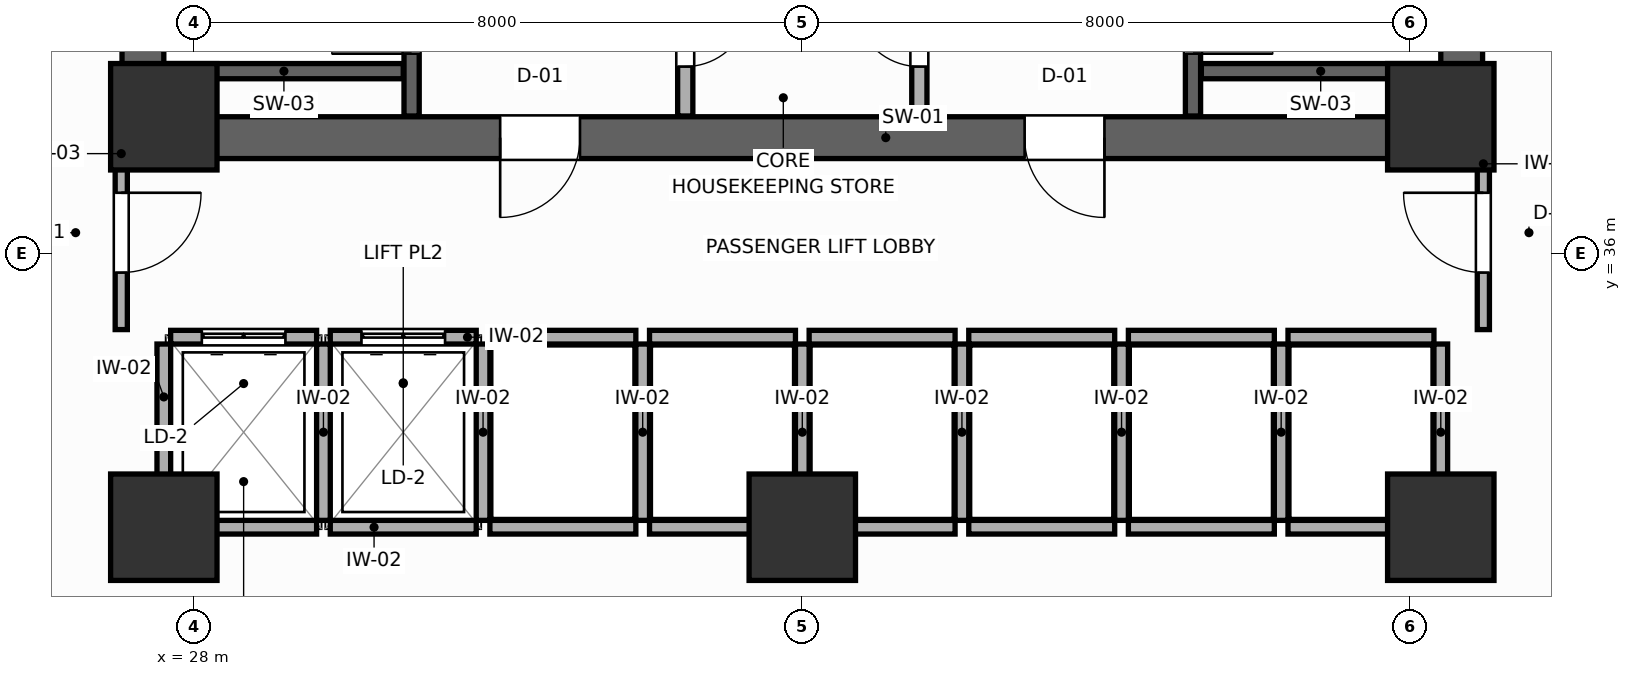
"""IFC4 building model, lengths in metres.
Left out: names, types, materials, properties, quantities, classifications, styles, units other than length and angle.
Written with IfcOpenShell. Run it as: python <this file> out.ifc"""

import sys

from ifc_helpers import new_model, si_unit, direction, frame, frame_2d, origin, origin_2d, place, context, subcontext, project, spatial, rectangle, extrude, source, transform, mapped, element, fill, save


model = new_model("IFC4")
c1 = context("Model", 3, precision=1e-05, world=origin(), true_north=direction((0.0, 1.0)))
c2 = subcontext(c1, "Body", "Model", "MODEL_VIEW")
j1 = project(units=[si_unit("LENGTHUNIT", "METRE"), si_unit("PLANEANGLEUNIT", "RADIAN")], contexts=[c1])
p1 = place(None, origin())
s1 = spatial("IfcSite", under=j1, at=p1, CompositionType="ELEMENT")
p2 = place(p1, origin())
s2 = spatial("IfcBuilding", under=s1, at=p2, CompositionType="ELEMENT")
p3 = place(p2, frame((0.0, 0.0, 24.0)))
s3 = spatial("IfcBuildingStorey", under=s2, at=p3, CompositionType="ELEMENT", Elevation=24.0)
p4 = place(p3, frame((27.05, 37.525, 0.0), z_axis=(0.0, 0.0, 1.0), x_axis=(1.0, 0.0, 0.0)))
e1 = element("IfcWall", 1, at=p4, inside=s3, PredefinedType="SHEAR", context=c2, shape_type="SweptSolid", body=[
    extrude(rectangle(XDim=17.9, YDim=0.55, at=frame_2d((8.95, 0.0))), origin(), (0.0, 0.0, 1.0), 3.9),
])
p5 = place(p4, frame((4.975, 0.0, 0.0)))
e2 = element("IfcOpeningElement", 2, at=p5, cuts=e1, PredefinedType="OPENING", context=c2, shape_type="SweptSolid", body=[
    extrude(rectangle(XDim=1.05, YDim=2.1, at=frame_2d((0.525, 1.05))), frame((0.0, 0.285, 0.0), z_axis=(0.0, -1.0, 0.0), x_axis=(1.0, 0.0, 0.0)), (0.0, 0.0, 1.0), 0.57),
])
p6 = place(p4, frame((11.875, 0.0, 0.0)))
e3 = element("IfcOpeningElement", 3, at=p6, cuts=e1, PredefinedType="OPENING", context=c2, shape_type="SweptSolid", body=[
    extrude(rectangle(XDim=1.05, YDim=2.1, at=frame_2d((0.525, 1.05))), frame((0.0, 0.285, 0.0), z_axis=(0.0, -1.0, 0.0), x_axis=(1.0, 0.0, 0.0)), (0.0, 0.0, 1.0), 0.57),
])
for number, where, z_axis, x_axis in (
    (4, (27.325, 37.8, 0.0), (0.0, 0.0, 1.0), (0.0, 1.0, 0.0)),
    (5, (44.675, 37.8, 0.0), (0.0, 0.0, 1.0), (0.0, 1.0, 0.0)),
):
    element("IfcWall", number, at=place(p3, frame(where, z_axis=z_axis, x_axis=x_axis)), inside=s3, PredefinedType="SHEAR", context=c2, shape_type="SweptSolid", body=[
        extrude(rectangle(XDim=9.0, YDim=0.55, at=frame_2d((4.5, 0.0))), origin(), (0.0, 0.0, 1.0), 3.9),
    ])
m1 = source(origin(), c2, "Body", "SweptSolid", [
    extrude(rectangle(XDim=1.4, YDim=1.4, at=origin_2d()), origin(), (0.0, 0.0, 1.0), 3.9),
])
for number, where, z_axis, x_axis in (
    (6, (27.6, 37.8, 0.0), (0.0, 0.0, 1.0), (1.0, 0.0, 0.0)),
    (7, (44.4, 37.8, 0.0), (0.0, 0.0, 1.0), (1.0, 0.0, 0.0)),
    (8, (27.6, 32.4, 0.0), (0.0, 0.0, 1.0), (1.0, 0.0, 0.0)),
    (9, (44.4, 32.4, 0.0), (0.0, 0.0, 1.0), (1.0, 0.0, 0.0)),
    (10, (36.0, 32.4, 0.0), (0.0, 0.0, 1.0), (1.0, 0.0, 0.0)),
):
    element("IfcColumn", number, at=place(p3, frame(where, z_axis=z_axis, x_axis=x_axis)), inside=s3, PredefinedType="COLUMN", context=c2, shape_type="MappedRepresentation", body=[
        mapped(m1, transform((0.0, 0.0, 0.0), scale=1.0)),
    ])
p7 = place(p3, frame((30.86, 37.81, 0.0), z_axis=(0.0, 0.0, 1.0), x_axis=(0.0, 1.0, 0.0)))
e11 = element("IfcWall", 11, at=p7, inside=s3, PredefinedType="SHEAR", context=c2, shape_type="SweptSolid", body=[
    extrude(rectangle(XDim=8.98, YDim=0.2, at=frame_2d((4.49, 0.0))), origin(), (0.0, 0.0, 1.0), 3.9),
])
p8 = place(p7, frame((0.82, 0.0, 0.0)))
e12 = element("IfcOpeningElement", 12, at=p8, cuts=e11, PredefinedType="OPENING", context=c2, shape_type="SweptSolid", body=[
    extrude(rectangle(XDim=1.05, YDim=2.1, at=frame_2d((0.525, 1.05))), frame((0.0, 0.11, 0.0), z_axis=(0.0, -1.0, 0.0), x_axis=(1.0, 0.0, 0.0)), (0.0, 0.0, 1.0), 0.22),
])
p9 = place(p3, frame((27.61, 38.4, 0.0), z_axis=(0.0, 0.0, 1.0), x_axis=(1.0, 0.0, 0.0)))
e13 = element("IfcWall", 13, at=p9, inside=s3, PredefinedType="SHEAR", context=c2, shape_type="SweptSolid", body=[
    extrude(rectangle(XDim=3.14, YDim=0.2, at=frame_2d((1.57, 0.0))), origin(), (0.0, 0.0, 1.0), 3.9),
])
p10 = place(p3, frame((41.14, 37.81, 0.0), z_axis=(0.0, 0.0, 1.0), x_axis=(0.0, 1.0, 0.0)))
e14 = element("IfcWall", 14, at=p10, inside=s3, PredefinedType="SHEAR", context=c2, shape_type="SweptSolid", body=[
    extrude(rectangle(XDim=8.98, YDim=0.2, at=frame_2d((4.49, 0.0))), origin(), (0.0, 0.0, 1.0), 3.9),
])
p11 = place(p10, frame((0.82, 0.0, 0.0)))
e15 = element("IfcOpeningElement", 15, at=p11, cuts=e14, PredefinedType="OPENING", context=c2, shape_type="SweptSolid", body=[
    extrude(rectangle(XDim=1.05, YDim=2.1, at=frame_2d((0.525, 1.05))), frame((0.0, 0.11, 0.0), z_axis=(0.0, -1.0, 0.0), x_axis=(1.0, 0.0, 0.0)), (0.0, 0.0, 1.0), 0.22),
])
p12 = place(p3, frame((41.25, 38.4, 0.0), z_axis=(0.0, 0.0, 1.0), x_axis=(1.0, 0.0, 0.0)))
e16 = element("IfcWall", 16, at=p12, inside=s3, PredefinedType="SHEAR", context=c2, shape_type="SweptSolid", body=[
    extrude(rectangle(XDim=3.14, YDim=0.2, at=frame_2d((1.57, 0.0))), origin(), (0.0, 0.0, 1.0), 3.9),
])
p13 = place(p3, frame((34.46, 37.81, 0.0), z_axis=(0.0, 0.0, 1.0), x_axis=(0.0, 1.0, 0.0)))
e17 = element("IfcWall", 17, at=p13, inside=s3, PredefinedType="PARTITIONING", context=c2, shape_type="SweptSolid", body=[
    extrude(rectangle(XDim=8.98, YDim=0.2, at=frame_2d((4.49, 0.0))), origin(), (0.0, 0.0, 1.0), 3.68),
])
p14 = place(p13, frame((0.65, 0.0, 0.0)))
e18 = element("IfcOpeningElement", 18, at=p14, cuts=e17, PredefinedType="OPENING", context=c2, shape_type="SweptSolid", body=[
    extrude(rectangle(XDim=0.85, YDim=2.05, at=frame_2d((0.425, 1.025))), frame((0.0, 0.11, 0.0), z_axis=(0.0, -1.0, 0.0), x_axis=(1.0, 0.0, 0.0)), (0.0, 0.0, 1.0), 0.22),
])
p15 = place(p3, frame((37.54, 37.81, 0.0), z_axis=(0.0, 0.0, 1.0), x_axis=(0.0, 1.0, 0.0)))
e19 = element("IfcWall", 19, at=p15, inside=s3, PredefinedType="PARTITIONING", context=c2, shape_type="SweptSolid", body=[
    extrude(rectangle(XDim=8.98, YDim=0.2, at=frame_2d((4.49, 0.0))), origin(), (0.0, 0.0, 1.0), 3.68),
])
p16 = place(p15, frame((0.65, 0.0, 0.0)))
e20 = element("IfcOpeningElement", 20, at=p16, cuts=e19, PredefinedType="OPENING", context=c2, shape_type="SweptSolid", body=[
    extrude(rectangle(XDim=0.85, YDim=2.05, at=frame_2d((0.425, 1.025))), frame((0.0, 0.11, 0.0), z_axis=(0.0, -1.0, 0.0), x_axis=(1.0, 0.0, 0.0)), (0.0, 0.0, 1.0), 0.22),
])
p17 = place(p3, frame((27.69, 34.9, 0.0), z_axis=(0.0, 0.0, 1.0), x_axis=(1.0, 0.0, 0.0)))
e21 = element("IfcWall", 21, at=p17, inside=s3, PredefinedType="PARTITIONING", context=c2, shape_type="SweptSolid", body=[
    extrude(rectangle(XDim=1.92, YDim=0.18, at=frame_2d((0.96, 0.0))), origin(), (0.0, 0.0, 1.0), 3.68),
])
p18 = place(p17, frame((0.41, 0.0, 0.0)))
e22 = element("IfcOpeningElement", 22, at=p18, cuts=e21, PredefinedType="OPENING", context=c2, shape_type="SweptSolid", body=[
    extrude(rectangle(XDim=1.1, YDim=2.1, at=frame_2d((0.55, 1.05))), frame((0.0, 0.1, 0.0), z_axis=(0.0, -1.0, 0.0), x_axis=(1.0, 0.0, 0.0)), (0.0, 0.0, 1.0), 0.2),
])
p19 = place(p3, frame((27.69, 32.4, 0.0), z_axis=(0.0, 0.0, 1.0), x_axis=(1.0, 0.0, 0.0)))
e23 = element("IfcWall", 23, at=p19, inside=s3, PredefinedType="PARTITIONING", context=c2, shape_type="SweptSolid", body=[
    extrude(rectangle(XDim=1.92, YDim=0.18, at=frame_2d((0.96, 0.0))), origin(), (0.0, 0.0, 1.0), 3.18),
])
p20 = place(p3, frame((27.6, 32.49, 0.0), z_axis=(0.0, 0.0, 1.0), x_axis=(0.0, 1.0, 0.0)))
e24 = element("IfcWall", 24, at=p20, inside=s3, PredefinedType="PARTITIONING", context=c2, shape_type="SweptSolid", body=[
    extrude(rectangle(XDim=2.32, YDim=0.18, at=frame_2d((1.16, 0.0))), origin(), (0.0, 0.0, 1.0), 3.68),
])
p21 = place(p3, frame((29.79, 34.9, 0.0), z_axis=(0.0, 0.0, 1.0), x_axis=(1.0, 0.0, 0.0)))
e25 = element("IfcWall", 25, at=p21, inside=s3, PredefinedType="PARTITIONING", context=c2, shape_type="SweptSolid", body=[
    extrude(rectangle(XDim=1.92, YDim=0.18, at=frame_2d((0.96, 0.0))), origin(), (0.0, 0.0, 1.0), 3.68),
])
p22 = place(p21, frame((0.41, 0.0, 0.0)))
e26 = element("IfcOpeningElement", 26, at=p22, cuts=e25, PredefinedType="OPENING", context=c2, shape_type="SweptSolid", body=[
    extrude(rectangle(XDim=1.1, YDim=2.1, at=frame_2d((0.55, 1.05))), frame((0.0, 0.1, 0.0), z_axis=(0.0, -1.0, 0.0), x_axis=(1.0, 0.0, 0.0)), (0.0, 0.0, 1.0), 0.2),
])
p23 = place(p3, frame((29.79, 32.4, 0.0), z_axis=(0.0, 0.0, 1.0), x_axis=(1.0, 0.0, 0.0)))
e27 = element("IfcWall", 27, at=p23, inside=s3, PredefinedType="PARTITIONING", context=c2, shape_type="SweptSolid", body=[
    extrude(rectangle(XDim=1.92, YDim=0.18, at=frame_2d((0.96, 0.0))), origin(), (0.0, 0.0, 1.0), 3.18),
])
p24 = place(p3, frame((29.7, 32.49, 0.0), z_axis=(0.0, 0.0, 1.0), x_axis=(0.0, 1.0, 0.0)))
e28 = element("IfcWall", 28, at=p24, inside=s3, PredefinedType="PARTITIONING", context=c2, shape_type="SweptSolid", body=[
    extrude(rectangle(XDim=2.32, YDim=0.18, at=frame_2d((1.16, 0.0))), origin(), (0.0, 0.0, 1.0), 3.68),
])
p25 = place(p3, frame((31.89, 34.9, 0.0), z_axis=(0.0, 0.0, 1.0), x_axis=(1.0, 0.0, 0.0)))
e29 = element("IfcWall", 29, at=p25, inside=s3, PredefinedType="PARTITIONING", context=c2, shape_type="SweptSolid", body=[
    extrude(rectangle(XDim=1.92, YDim=0.18, at=frame_2d((0.96, 0.0))), origin(), (0.0, 0.0, 1.0), 3.68),
])
p26 = place(p3, frame((31.89, 32.4, 0.0), z_axis=(0.0, 0.0, 1.0), x_axis=(1.0, 0.0, 0.0)))
e30 = element("IfcWall", 30, at=p26, inside=s3, PredefinedType="PARTITIONING", context=c2, shape_type="SweptSolid", body=[
    extrude(rectangle(XDim=1.92, YDim=0.18, at=frame_2d((0.96, 0.0))), origin(), (0.0, 0.0, 1.0), 3.18),
])
p27 = place(p3, frame((31.8, 32.49, 0.0), z_axis=(0.0, 0.0, 1.0), x_axis=(0.0, 1.0, 0.0)))
e31 = element("IfcWall", 31, at=p27, inside=s3, PredefinedType="PARTITIONING", context=c2, shape_type="SweptSolid", body=[
    extrude(rectangle(XDim=2.32, YDim=0.18, at=frame_2d((1.16, 0.0))), origin(), (0.0, 0.0, 1.0), 3.68),
])
p28 = place(p3, frame((33.99, 34.9, 0.0), z_axis=(0.0, 0.0, 1.0), x_axis=(1.0, 0.0, 0.0)))
e32 = element("IfcWall", 32, at=p28, inside=s3, PredefinedType="PARTITIONING", context=c2, shape_type="SweptSolid", body=[
    extrude(rectangle(XDim=1.92, YDim=0.18, at=frame_2d((0.96, 0.0))), origin(), (0.0, 0.0, 1.0), 3.68),
])
p29 = place(p3, frame((33.99, 32.4, 0.0), z_axis=(0.0, 0.0, 1.0), x_axis=(1.0, 0.0, 0.0)))
e33 = element("IfcWall", 33, at=p29, inside=s3, PredefinedType="PARTITIONING", context=c2, shape_type="SweptSolid", body=[
    extrude(rectangle(XDim=1.92, YDim=0.18, at=frame_2d((0.96, 0.0))), origin(), (0.0, 0.0, 1.0), 3.18),
])
p30 = place(p3, frame((33.9, 32.49, 0.0), z_axis=(0.0, 0.0, 1.0), x_axis=(0.0, 1.0, 0.0)))
e34 = element("IfcWall", 34, at=p30, inside=s3, PredefinedType="PARTITIONING", context=c2, shape_type="SweptSolid", body=[
    extrude(rectangle(XDim=2.32, YDim=0.18, at=frame_2d((1.16, 0.0))), origin(), (0.0, 0.0, 1.0), 3.68),
])
p31 = place(p3, frame((36.09, 34.9, 0.0), z_axis=(0.0, 0.0, 1.0), x_axis=(1.0, 0.0, 0.0)))
e35 = element("IfcWall", 35, at=p31, inside=s3, PredefinedType="PARTITIONING", context=c2, shape_type="SweptSolid", body=[
    extrude(rectangle(XDim=1.92, YDim=0.18, at=frame_2d((0.96, 0.0))), origin(), (0.0, 0.0, 1.0), 3.68),
])
p32 = place(p3, frame((36.09, 32.4, 0.0), z_axis=(0.0, 0.0, 1.0), x_axis=(1.0, 0.0, 0.0)))
e36 = element("IfcWall", 36, at=p32, inside=s3, PredefinedType="PARTITIONING", context=c2, shape_type="SweptSolid", body=[
    extrude(rectangle(XDim=1.92, YDim=0.18, at=frame_2d((0.96, 0.0))), origin(), (0.0, 0.0, 1.0), 3.18),
])
p33 = place(p3, frame((36.0, 32.49, 0.0), z_axis=(0.0, 0.0, 1.0), x_axis=(0.0, 1.0, 0.0)))
e37 = element("IfcWall", 37, at=p33, inside=s3, PredefinedType="PARTITIONING", context=c2, shape_type="SweptSolid", body=[
    extrude(rectangle(XDim=2.32, YDim=0.18, at=frame_2d((1.16, 0.0))), origin(), (0.0, 0.0, 1.0), 3.68),
])
p34 = place(p3, frame((38.19, 34.9, 0.0), z_axis=(0.0, 0.0, 1.0), x_axis=(1.0, 0.0, 0.0)))
e38 = element("IfcWall", 38, at=p34, inside=s3, PredefinedType="PARTITIONING", context=c2, shape_type="SweptSolid", body=[
    extrude(rectangle(XDim=1.92, YDim=0.18, at=frame_2d((0.96, 0.0))), origin(), (0.0, 0.0, 1.0), 3.68),
])
p35 = place(p3, frame((38.19, 32.4, 0.0), z_axis=(0.0, 0.0, 1.0), x_axis=(1.0, 0.0, 0.0)))
e39 = element("IfcWall", 39, at=p35, inside=s3, PredefinedType="PARTITIONING", context=c2, shape_type="SweptSolid", body=[
    extrude(rectangle(XDim=1.92, YDim=0.18, at=frame_2d((0.96, 0.0))), origin(), (0.0, 0.0, 1.0), 3.18),
])
p36 = place(p3, frame((38.1, 32.49, 0.0), z_axis=(0.0, 0.0, 1.0), x_axis=(0.0, 1.0, 0.0)))
e40 = element("IfcWall", 40, at=p36, inside=s3, PredefinedType="PARTITIONING", context=c2, shape_type="SweptSolid", body=[
    extrude(rectangle(XDim=2.32, YDim=0.18, at=frame_2d((1.16, 0.0))), origin(), (0.0, 0.0, 1.0), 3.68),
])
p37 = place(p3, frame((40.29, 34.9, 0.0), z_axis=(0.0, 0.0, 1.0), x_axis=(1.0, 0.0, 0.0)))
e41 = element("IfcWall", 41, at=p37, inside=s3, PredefinedType="PARTITIONING", context=c2, shape_type="SweptSolid", body=[
    extrude(rectangle(XDim=1.92, YDim=0.18, at=frame_2d((0.96, 0.0))), origin(), (0.0, 0.0, 1.0), 3.68),
])
p38 = place(p3, frame((40.29, 32.4, 0.0), z_axis=(0.0, 0.0, 1.0), x_axis=(1.0, 0.0, 0.0)))
e42 = element("IfcWall", 42, at=p38, inside=s3, PredefinedType="PARTITIONING", context=c2, shape_type="SweptSolid", body=[
    extrude(rectangle(XDim=1.92, YDim=0.18, at=frame_2d((0.96, 0.0))), origin(), (0.0, 0.0, 1.0), 3.18),
])
p39 = place(p3, frame((40.2, 32.49, 0.0), z_axis=(0.0, 0.0, 1.0), x_axis=(0.0, 1.0, 0.0)))
e43 = element("IfcWall", 43, at=p39, inside=s3, PredefinedType="PARTITIONING", context=c2, shape_type="SweptSolid", body=[
    extrude(rectangle(XDim=2.32, YDim=0.18, at=frame_2d((1.16, 0.0))), origin(), (0.0, 0.0, 1.0), 3.68),
])
p40 = place(p3, frame((42.39, 34.9, 0.0), z_axis=(0.0, 0.0, 1.0), x_axis=(1.0, 0.0, 0.0)))
e44 = element("IfcWall", 44, at=p40, inside=s3, PredefinedType="PARTITIONING", context=c2, shape_type="SweptSolid", body=[
    extrude(rectangle(XDim=1.92, YDim=0.18, at=frame_2d((0.96, 0.0))), origin(), (0.0, 0.0, 1.0), 3.68),
])
p41 = place(p3, frame((42.39, 32.4, 0.0), z_axis=(0.0, 0.0, 1.0), x_axis=(1.0, 0.0, 0.0)))
e45 = element("IfcWall", 45, at=p41, inside=s3, PredefinedType="PARTITIONING", context=c2, shape_type="SweptSolid", body=[
    extrude(rectangle(XDim=1.92, YDim=0.18, at=frame_2d((0.96, 0.0))), origin(), (0.0, 0.0, 1.0), 3.18),
])
for number, where, z_axis, x_axis in (
    (46, (42.3, 32.49, 0.0), (0.0, 0.0, 1.0), (0.0, 1.0, 0.0)),
    (47, (44.4, 32.49, 0.0), (0.0, 0.0, 1.0), (0.0, 1.0, 0.0)),
):
    element("IfcWall", number, at=place(p3, frame(where, z_axis=z_axis, x_axis=x_axis)), inside=s3, PredefinedType="PARTITIONING", context=c2, shape_type="SweptSolid", body=[
        extrude(rectangle(XDim=2.32, YDim=0.18, at=frame_2d((1.16, 0.0))), origin(), (0.0, 0.0, 1.0), 3.68),
    ])
p42 = place(p3, frame((27.04, 35.0, 0.0), z_axis=(0.0, 0.0, 1.0), x_axis=(0.0, 1.0, 0.0)))
e48 = element("IfcWall", 48, at=p42, inside=s3, PredefinedType="PARTITIONING", context=c2, shape_type="SweptSolid", body=[
    extrude(rectangle(XDim=2.65, YDim=0.16, at=frame_2d((1.325, 0.0))), origin(), (0.0, 0.0, 1.0), 3.68),
])
p43 = place(p42, frame((0.75, 0.0, 0.0)))
e49 = element("IfcOpeningElement", 49, at=p43, cuts=e48, PredefinedType="OPENING", context=c2, shape_type="SweptSolid", body=[
    extrude(rectangle(XDim=1.05, YDim=2.1, at=frame_2d((0.525, 1.05))), frame((0.0, 0.09, 0.0), z_axis=(0.0, -1.0, 0.0), x_axis=(1.0, 0.0, 0.0)), (0.0, 0.0, 1.0), 0.18),
])
p44 = place(p3, frame((44.96, 35.0, 0.0), z_axis=(0.0, 0.0, 1.0), x_axis=(0.0, 1.0, 0.0)))
e50 = element("IfcWall", 50, at=p44, inside=s3, PredefinedType="PARTITIONING", context=c2, shape_type="SweptSolid", body=[
    extrude(rectangle(XDim=2.65, YDim=0.16, at=frame_2d((1.325, 0.0))), origin(), (0.0, 0.0, 1.0), 3.68),
])
p45 = place(p44, frame((0.75, 0.0, 0.0)))
e51 = element("IfcOpeningElement", 51, at=p45, cuts=e50, PredefinedType="OPENING", context=c2, shape_type="SweptSolid", body=[
    extrude(rectangle(XDim=1.05, YDim=2.1, at=frame_2d((0.525, 1.05))), frame((0.0, 0.09, 0.0), z_axis=(0.0, -1.0, 0.0), x_axis=(1.0, 0.0, 0.0)), (0.0, 0.0, 1.0), 0.18),
])
p46 = place(p8, origin())
e52 = element("IfcDoor", 52, at=p46, inside=s3, OperationType="SINGLE_SWING_LEFT", PredefinedType="DOOR", context=c2, shape_type="SweptSolid", body=[
    extrude(rectangle(XDim=1.05, YDim=2.1, at=frame_2d((0.525, 1.05))), frame((0.0, 0.025, 0.0), z_axis=(0.0, -1.0, 0.0), x_axis=(1.0, 0.0, 0.0)), (0.0, 0.0, 1.0), 0.05),
])
fill(e12, e52)
p47 = place(p11, frame((1.05, 0.0, 0.0), z_axis=(0.0, 0.0, 1.0), x_axis=(-1.0, 0.0, 0.0)))
e53 = element("IfcDoor", 53, at=p47, inside=s3, OperationType="SINGLE_SWING_RIGHT", PredefinedType="DOOR", context=c2, shape_type="SweptSolid", body=[
    extrude(rectangle(XDim=1.05, YDim=2.1, at=frame_2d((0.525, 1.05))), frame((0.0, 0.025, 0.0), z_axis=(0.0, -1.0, 0.0), x_axis=(1.0, 0.0, 0.0)), (0.0, 0.0, 1.0), 0.05),
])
fill(e15, e53)
p48 = place(p14, frame((0.85, 0.0, 0.0), z_axis=(0.0, 0.0, 1.0), x_axis=(-1.0, 0.0, 0.0)))
e54 = element("IfcDoor", 54, at=p48, inside=s3, OperationType="SINGLE_SWING_LEFT", PredefinedType="DOOR", context=c2, shape_type="SweptSolid", body=[
    extrude(rectangle(XDim=0.85, YDim=2.05, at=frame_2d((0.425, 1.025))), frame((0.0, 0.025, 0.0), z_axis=(0.0, -1.0, 0.0), x_axis=(1.0, 0.0, 0.0)), (0.0, 0.0, 1.0), 0.05),
])
fill(e18, e54)
p49 = place(p16, origin())
e55 = element("IfcDoor", 55, at=p49, inside=s3, OperationType="SINGLE_SWING_RIGHT", PredefinedType="DOOR", context=c2, shape_type="SweptSolid", body=[
    extrude(rectangle(XDim=0.85, YDim=2.05, at=frame_2d((0.425, 1.025))), frame((0.0, 0.025, 0.0), z_axis=(0.0, -1.0, 0.0), x_axis=(1.0, 0.0, 0.0)), (0.0, 0.0, 1.0), 0.05),
])
fill(e20, e55)
p50 = place(p18, origin())
e56 = element("IfcDoor", 56, at=p50, inside=s3, OperationType="DOUBLE_DOOR_SLIDING", PredefinedType="DOOR", context=c2, shape_type="SweptSolid", body=[
    extrude(rectangle(XDim=1.1, YDim=2.1, at=frame_2d((0.55, 1.05))), frame((0.0, 0.025, 0.0), z_axis=(0.0, -1.0, 0.0), x_axis=(1.0, 0.0, 0.0)), (0.0, 0.0, 1.0), 0.05),
])
fill(e22, e56)
p51 = place(p22, origin())
e57 = element("IfcDoor", 57, at=p51, inside=s3, OperationType="DOUBLE_DOOR_SLIDING", PredefinedType="DOOR", context=c2, shape_type="SweptSolid", body=[
    extrude(rectangle(XDim=1.1, YDim=2.1, at=frame_2d((0.55, 1.05))), frame((0.0, 0.025, 0.0), z_axis=(0.0, -1.0, 0.0), x_axis=(1.0, 0.0, 0.0)), (0.0, 0.0, 1.0), 0.05),
])
fill(e26, e57)
p52 = place(p43, frame((1.05, 0.0, 0.0), z_axis=(0.0, 0.0, 1.0), x_axis=(-1.0, 0.0, 0.0)))
e58 = element("IfcDoor", 58, at=p52, inside=s3, OperationType="SINGLE_SWING_LEFT", PredefinedType="DOOR", context=c2, shape_type="SweptSolid", body=[
    extrude(rectangle(XDim=1.05, YDim=2.1, at=frame_2d((0.525, 1.05))), frame((0.0, 0.025, 0.0), z_axis=(0.0, -1.0, 0.0), x_axis=(1.0, 0.0, 0.0)), (0.0, 0.0, 1.0), 0.05),
])
fill(e49, e58)
p53 = place(p45, origin())
e59 = element("IfcDoor", 59, at=p53, inside=s3, OperationType="SINGLE_SWING_RIGHT", PredefinedType="DOOR", context=c2, shape_type="SweptSolid", body=[
    extrude(rectangle(XDim=1.05, YDim=2.1, at=frame_2d((0.525, 1.05))), frame((0.0, 0.025, 0.0), z_axis=(0.0, -1.0, 0.0), x_axis=(1.0, 0.0, 0.0)), (0.0, 0.0, 1.0), 0.05),
])
fill(e51, e59)
p54 = place(p5, frame((1.05, 0.0, 0.0), z_axis=(0.0, 0.0, 1.0), x_axis=(-1.0, 0.0, 0.0)))
e60 = element("IfcDoor", 60, at=p54, inside=s3, OperationType="SINGLE_SWING_RIGHT", PredefinedType="DOOR", context=c2, shape_type="SweptSolid", body=[
    extrude(rectangle(XDim=1.05, YDim=2.1, at=frame_2d((0.525, 1.05))), frame((0.0, 0.025, 0.0), z_axis=(0.0, -1.0, 0.0), x_axis=(1.0, 0.0, 0.0)), (0.0, 0.0, 1.0), 0.05),
])
fill(e2, e60)
p55 = place(p6, frame((1.05, 0.0, 0.0), z_axis=(0.0, 0.0, 1.0), x_axis=(-1.0, 0.0, 0.0)))
e61 = element("IfcDoor", 61, at=p55, inside=s3, OperationType="SINGLE_SWING_LEFT", PredefinedType="DOOR", context=c2, shape_type="SweptSolid", body=[
    extrude(rectangle(XDim=1.05, YDim=2.1, at=frame_2d((0.525, 1.05))), frame((0.0, 0.025, 0.0), z_axis=(0.0, -1.0, 0.0), x_axis=(1.0, 0.0, 0.0)), (0.0, 0.0, 1.0), 0.05),
])
fill(e3, e61)
save(model, sys.argv[1])
